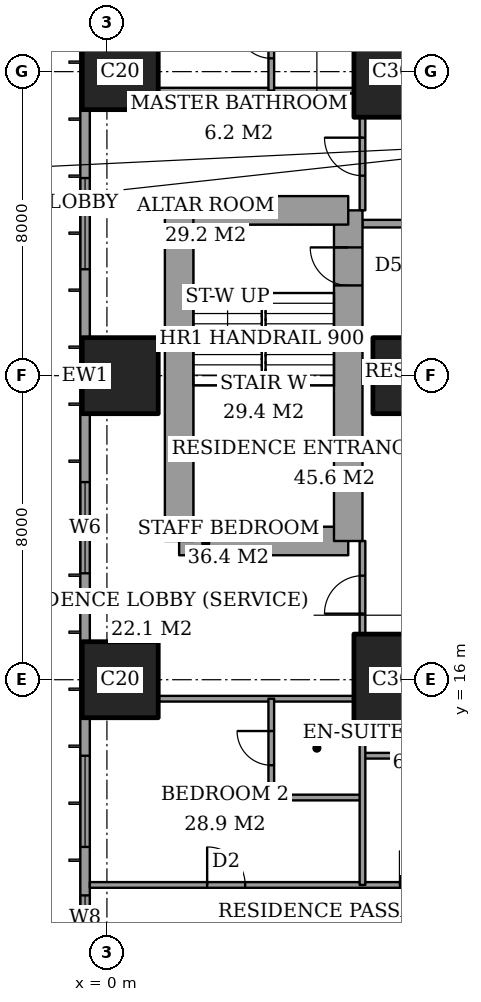
"""IFC4 building model, lengths in metres.
Left out: names, types, materials, properties, quantities, classifications, styles, units other than length and angle.
Written with IfcOpenShell. Run it as: python <this file> out.ifc"""

import sys

from ifc_helpers import new_model, si_unit, direction, frame, frame_2d, origin, origin_2d, place, context, subcontext, project, spatial, rectangle, extrude, element, fill, save


model = new_model("IFC4")
c1 = context("Model", 3, precision=1e-05, world=origin(), true_north=direction((0.0, 1.0)))
c2 = subcontext(c1, "Body", "Model", "MODEL_VIEW")
j1 = project(units=[si_unit("LENGTHUNIT", "METRE"), si_unit("PLANEANGLEUNIT", "RADIAN")], contexts=[c1])
p1 = place(None, origin())
s1 = spatial("IfcSite", under=j1, at=p1, CompositionType="ELEMENT")
p2 = place(p1, origin())
s2 = spatial("IfcBuilding", under=s1, at=p2, CompositionType="ELEMENT")
p3 = place(p2, frame((0.0, 0.0, 65.6)))
s3 = spatial("IfcBuildingStorey", under=s2, at=p3, CompositionType="ELEMENT", Elevation=65.6)
for number, where, z_axis, x_axis in (
    (1, (0.35, 16.0, 0.0), (0.0, 0.0, 1.0), (1.0, 0.0, 0.0)),
    (2, (0.35, 24.0, 0.0), (0.0, 0.0, 1.0), (1.0, 0.0, 0.0)),
    (3, (0.35, 32.0, 0.0), (0.0, 0.0, 1.0), (1.0, 0.0, 0.0)),
):
    element("IfcColumn", number, at=place(p3, frame(where, z_axis=z_axis, x_axis=x_axis)), inside=s3, PredefinedType="COLUMN", context=c2, shape_type="SweptSolid", body=[
        extrude(rectangle(XDim=2.0, YDim=2.0, at=origin_2d()), origin(), (0.0, 0.0, 1.0), 3.6),
    ])
p4 = place(p3, frame((8.0, 16.0, 0.0), z_axis=(0.0, 0.0, 1.0), x_axis=(1.0, 0.0, 0.0)))
e4 = element("IfcColumn", 4, at=p4, inside=s3, PredefinedType="COLUMN", context=c2, shape_type="SweptSolid", body=[
    extrude(rectangle(XDim=3.0, YDim=2.4, at=origin_2d()), origin(), (0.0, 0.0, 1.0), 3.6),
])
p5 = place(p3, frame((8.0, 24.0, 0.0), z_axis=(0.0, 0.0, 1.0), x_axis=(1.0, 0.0, 0.0)))
e5 = element("IfcColumn", 5, at=p5, inside=s3, PredefinedType="COLUMN", context=c2, shape_type="SweptSolid", body=[
    extrude(rectangle(XDim=2.0, YDim=2.0, at=origin_2d()), origin(), (0.0, 0.0, 1.0), 3.6),
])
p6 = place(p3, frame((8.0, 32.0, 0.0), z_axis=(0.0, 0.0, 1.0), x_axis=(1.0, 0.0, 0.0)))
e6 = element("IfcColumn", 6, at=p6, inside=s3, PredefinedType="COLUMN", context=c2, shape_type="SweptSolid", body=[
    extrude(rectangle(XDim=3.0, YDim=2.4, at=origin_2d()), origin(), (0.0, 0.0, 1.0), 3.6),
])
p7 = place(p3, frame((1.9, 19.65, 0.0), z_axis=(0.0, 0.0, 1.0), x_axis=(1.0, 0.0, 0.0)))
e7 = element("IfcWall", 7, at=p7, inside=s3, PredefinedType="SHEAR", context=c2, shape_type="SweptSolid", body=[
    extrude(rectangle(XDim=4.45, YDim=0.75, at=frame_2d((2.225, 0.0))), origin(), (0.0, 0.0, 1.0), 3.6),
])
p8 = place(p3, frame((6.35, 19.65, 0.0), z_axis=(0.0, 0.0, 1.0), x_axis=(0.0, 1.0, 0.0)))
e8 = element("IfcWall", 8, at=p8, inside=s3, PredefinedType="SHEAR", context=c2, shape_type="SweptSolid", body=[
    extrude(rectangle(XDim=8.7, YDim=0.75, at=frame_2d((4.35, 0.0))), origin(), (0.0, 0.0, 1.0), 3.6),
])
p9 = place(p8, frame((6.725, 0.0, 0.0)))
e9 = element("IfcOpeningElement", 9, at=p9, cuts=e8, PredefinedType="OPENING", context=c2, shape_type="SweptSolid", body=[
    extrude(rectangle(XDim=1.0, YDim=2.1, at=frame_2d((0.5, 1.05))), frame((0.0, 0.385, 0.0), z_axis=(0.0, -1.0, 0.0), x_axis=(1.0, 0.0, 0.0)), (0.0, 0.0, 1.0), 0.77),
])
p10 = place(p3, frame((6.35, 28.35, 0.0), z_axis=(0.0, 0.0, 1.0), x_axis=(-1.0, 0.0, 0.0)))
e10 = element("IfcWall", 10, at=p10, inside=s3, PredefinedType="SHEAR", context=c2, shape_type="SweptSolid", body=[
    extrude(rectangle(XDim=4.45, YDim=0.75, at=frame_2d((2.225, 0.0))), origin(), (0.0, 0.0, 1.0), 3.6),
])
p11 = place(p3, frame((1.9, 28.35, 0.0), z_axis=(0.0, 0.0, 1.0), x_axis=(0.0, -1.0, 0.0)))
e11 = element("IfcWall", 11, at=p11, inside=s3, PredefinedType="SHEAR", context=c2, shape_type="SweptSolid", body=[
    extrude(rectangle(XDim=8.7, YDim=0.75, at=frame_2d((4.35, 0.0))), origin(), (0.0, 0.0, 1.0), 3.6),
])
p12 = place(p3, frame((-0.575, 44.825, 0.0), z_axis=(0.0, 0.0, 1.0), x_axis=(0.0, -1.0, 0.0)))
e12 = element("IfcWall", 12, at=p12, inside=s3, PredefinedType="SOLIDWALL", context=c2, shape_type="SweptSolid", body=[
    extrude(rectangle(XDim=41.65, YDim=0.25, at=frame_2d((20.825, 0.0))), origin(), (0.0, 0.0, 1.0), 3.6),
])
p13 = place(p12, frame((0.775, 0.0, 0.6)))
e13 = element("IfcOpeningElement", 13, at=p13, cuts=e12, PredefinedType="OPENING", context=c2, shape_type="SweptSolid", body=[
    extrude(rectangle(XDim=2.4, YDim=2.0, at=frame_2d((1.2, 1.0))), frame((0.0, 0.135, 0.0), z_axis=(0.0, -1.0, 0.0), x_axis=(1.0, 0.0, 0.0)), (0.0, 0.0, 1.0), 0.27),
])
p14 = place(p12, frame((6.1, 0.0, 0.6)))
e14 = element("IfcOpeningElement", 14, at=p14, cuts=e12, PredefinedType="OPENING", context=c2, shape_type="SweptSolid", body=[
    extrude(rectangle(XDim=1.2, YDim=2.0, at=frame_2d((0.6, 1.0))), frame((0.0, 0.135, 0.0), z_axis=(0.0, -1.0, 0.0), x_axis=(1.0, 0.0, 0.0)), (0.0, 0.0, 1.0), 0.27),
])
p15 = place(p12, frame((8.425, 0.0, 0.6)))
e15 = element("IfcOpeningElement", 15, at=p15, cuts=e12, PredefinedType="OPENING", context=c2, shape_type="SweptSolid", body=[
    extrude(rectangle(XDim=2.4, YDim=2.0, at=frame_2d((1.2, 1.0))), frame((0.0, 0.135, 0.0), z_axis=(0.0, -1.0, 0.0), x_axis=(1.0, 0.0, 0.0)), (0.0, 0.0, 1.0), 0.27),
])
p16 = place(p12, frame((15.625, 0.0, 0.6)))
e16 = element("IfcOpeningElement", 16, at=p16, cuts=e12, PredefinedType="OPENING", context=c2, shape_type="SweptSolid", body=[
    extrude(rectangle(XDim=2.4, YDim=2.0, at=frame_2d((1.2, 1.0))), frame((0.0, 0.135, 0.0), z_axis=(0.0, -1.0, 0.0), x_axis=(1.0, 0.0, 0.0)), (0.0, 0.0, 1.0), 0.27),
])
p17 = place(p12, frame((23.625, 0.0, 0.6)))
e17 = element("IfcOpeningElement", 17, at=p17, cuts=e12, PredefinedType="OPENING", context=c2, shape_type="SweptSolid", body=[
    extrude(rectangle(XDim=2.4, YDim=2.0, at=frame_2d((1.2, 1.0))), frame((0.0, 0.135, 0.0), z_axis=(0.0, -1.0, 0.0), x_axis=(1.0, 0.0, 0.0)), (0.0, 0.0, 1.0), 0.27),
])
p18 = place(p12, frame((30.825, 0.0, 0.6)))
e18 = element("IfcOpeningElement", 18, at=p18, cuts=e12, PredefinedType="OPENING", context=c2, shape_type="SweptSolid", body=[
    extrude(rectangle(XDim=2.4, YDim=2.0, at=frame_2d((1.2, 1.0))), frame((0.0, 0.135, 0.0), z_axis=(0.0, -1.0, 0.0), x_axis=(1.0, 0.0, 0.0)), (0.0, 0.0, 1.0), 0.27),
])
p19 = place(p12, frame((34.5, 0.0, 0.6)))
e19 = element("IfcOpeningElement", 19, at=p19, cuts=e12, PredefinedType="OPENING", context=c2, shape_type="SweptSolid", body=[
    extrude(rectangle(XDim=1.2, YDim=2.0, at=frame_2d((0.6, 1.0))), frame((0.0, 0.135, 0.0), z_axis=(0.0, -1.0, 0.0), x_axis=(1.0, 0.0, 0.0)), (0.0, 0.0, 1.0), 0.27),
])
p20 = place(p12, frame((38.475, 0.0, 0.6)))
e20 = element("IfcOpeningElement", 20, at=p20, cuts=e12, PredefinedType="OPENING", context=c2, shape_type="SweptSolid", body=[
    extrude(rectangle(XDim=2.4, YDim=2.0, at=frame_2d((1.2, 1.0))), frame((0.0, 0.135, 0.0), z_axis=(0.0, -1.0, 0.0), x_axis=(1.0, 0.0, 0.0)), (0.0, 0.0, 1.0), 0.27),
])
p21 = place(p3, frame((-0.45, 10.6, 0.0), z_axis=(0.0, 0.0, 1.0), x_axis=(1.0, 0.0, 0.0)))
e21 = element("IfcWall", 21, at=p21, inside=s3, PredefinedType="PARTITIONING", context=c2, shape_type="SweptSolid", body=[
    extrude(rectangle(XDim=25.011, YDim=0.15, at=frame_2d((12.505, 0.0))), origin(), (0.0, 0.0, 1.0), 3.35),
])
p22 = place(p21, frame((10.65, 0.0, 0.0)))
e22 = element("IfcOpeningElement", 22, at=p22, cuts=e21, PredefinedType="OPENING", context=c2, shape_type="SweptSolid", body=[
    extrude(rectangle(XDim=1.0, YDim=2.1, at=frame_2d((0.5, 1.05))), frame((0.0, 0.085, 0.0), z_axis=(0.0, -1.0, 0.0), x_axis=(1.0, 0.0, 0.0)), (0.0, 0.0, 1.0), 0.17),
])
p23 = place(p21, frame((3.087, 0.0, 0.0)))
e23 = element("IfcOpeningElement", 23, at=p23, cuts=e21, PredefinedType="OPENING", context=c2, shape_type="SweptSolid", body=[
    extrude(rectangle(XDim=1.0, YDim=2.1, at=frame_2d((0.5, 1.05))), frame((0.0, 0.085, 0.0), z_axis=(0.0, -1.0, 0.0), x_axis=(1.0, 0.0, 0.0)), (0.0, 0.0, 1.0), 0.17),
])
p24 = place(p21, frame((8.163, 0.0, 0.0)))
e24 = element("IfcOpeningElement", 24, at=p24, cuts=e21, PredefinedType="OPENING", context=c2, shape_type="SweptSolid", body=[
    extrude(rectangle(XDim=0.9, YDim=2.1, at=frame_2d((0.45, 1.05))), frame((0.0, 0.085, 0.0), z_axis=(0.0, -1.0, 0.0), x_axis=(1.0, 0.0, 0.0)), (0.0, 0.0, 1.0), 0.17),
])
p25 = place(p21, frame((13.35, 0.0, 0.0)))
e25 = element("IfcOpeningElement", 25, at=p25, cuts=e21, PredefinedType="OPENING", context=c2, shape_type="SweptSolid", body=[
    extrude(rectangle(XDim=1.0, YDim=2.1, at=frame_2d((0.5, 1.05))), frame((0.0, 0.085, 0.0), z_axis=(0.0, -1.0, 0.0), x_axis=(1.0, 0.0, 0.0)), (0.0, 0.0, 1.0), 0.17),
])
p26 = place(p21, frame((16.45, 0.0, 0.0)))
e26 = element("IfcOpeningElement", 26, at=p26, cuts=e21, PredefinedType="OPENING", context=c2, shape_type="SweptSolid", body=[
    extrude(rectangle(XDim=1.0, YDim=2.1, at=frame_2d((0.5, 1.05))), frame((0.0, 0.085, 0.0), z_axis=(0.0, -1.0, 0.0), x_axis=(1.0, 0.0, 0.0)), (0.0, 0.0, 1.0), 0.17),
])
p27 = place(p21, frame((21.175, 0.0, 0.0)))
e27 = element("IfcOpeningElement", 27, at=p27, cuts=e21, PredefinedType="OPENING", context=c2, shape_type="SweptSolid", body=[
    extrude(rectangle(XDim=1.0, YDim=2.1, at=frame_2d((0.5, 1.05))), frame((0.0, 0.085, 0.0), z_axis=(0.0, -1.0, 0.0), x_axis=(1.0, 0.0, 0.0)), (0.0, 0.0, 1.0), 0.17),
])
p28 = place(p3, frame((4.325, 12.9, 0.0), z_axis=(0.0, 0.0, 1.0), x_axis=(1.0, 0.0, 0.0)))
e28 = element("IfcWall", 28, at=p28, inside=s3, PredefinedType="PARTITIONING", context=c2, shape_type="SweptSolid", body=[
    extrude(rectangle(XDim=2.4, YDim=0.15, at=frame_2d((1.2, 0.0))), origin(), (0.0, 0.0, 1.0), 3.35),
])
p29 = place(p3, frame((6.725, 14.0, 0.0), z_axis=(0.0, 0.0, 1.0), x_axis=(1.0, 0.0, 0.0)))
e29 = element("IfcWall", 29, at=p29, inside=s3, PredefinedType="PARTITIONING", context=c2, shape_type="SweptSolid", body=[
    extrude(rectangle(XDim=2.875, YDim=0.15, at=frame_2d((1.438, 0.0))), origin(), (0.0, 0.0, 1.0), 3.35),
])
p30 = place(p3, frame((1.35, 15.5, 0.0), z_axis=(0.0, 0.0, 1.0), x_axis=(1.0, 0.0, 0.0)))
e30 = element("IfcWall", 30, at=p30, inside=s3, PredefinedType="PARTITIONING", context=c2, shape_type="SweptSolid", body=[
    extrude(rectangle(XDim=5.15, YDim=0.15, at=frame_2d((2.575, 0.0))), origin(), (0.0, 0.0, 1.0), 3.35),
])
p31 = place(p3, frame((6.725, 28.0, 0.0), z_axis=(0.0, 0.0, 1.0), x_axis=(1.0, 0.0, 0.0)))
e31 = element("IfcWall", 31, at=p31, inside=s3, PredefinedType="PARTITIONING", context=c2, shape_type="SweptSolid", body=[
    extrude(rectangle(XDim=17.275, YDim=0.2, at=frame_2d((8.637, 0.0))), origin(), (0.0, 0.0, 1.0), 3.35),
])
p32 = place(p31, frame((6.475, 0.0, 0.0)))
e32 = element("IfcOpeningElement", 32, at=p32, cuts=e31, PredefinedType="OPENING", context=c2, shape_type="SweptSolid", body=[
    extrude(rectangle(XDim=1.2, YDim=2.4, at=frame_2d((0.6, 1.2))), frame((0.0, 0.11, 0.0), z_axis=(0.0, -1.0, 0.0), x_axis=(1.0, 0.0, 0.0)), (0.0, 0.0, 1.0), 0.22),
])
p33 = place(p3, frame((1.35, 31.5, 0.0), z_axis=(0.0, 0.0, 1.0), x_axis=(1.0, 0.0, 0.0)))
e33 = element("IfcWall", 33, at=p33, inside=s3, PredefinedType="PARTITIONING", context=c2, shape_type="SweptSolid", body=[
    extrude(rectangle(XDim=5.15, YDim=0.15, at=frame_2d((2.575, 0.0))), origin(), (0.0, 0.0, 1.0), 3.35),
])
p34 = place(p3, frame((4.325, 12.9, 0.0), z_axis=(0.0, 0.0, 1.0), x_axis=(0.0, 1.0, 0.0)))
e34 = element("IfcWall", 34, at=p34, inside=s3, PredefinedType="PARTITIONING", context=c2, shape_type="SweptSolid", body=[
    extrude(rectangle(XDim=2.6, YDim=0.15, at=frame_2d((1.3, 0.0))), origin(), (0.0, 0.0, 1.0), 3.35),
])
p35 = place(p34, frame((0.85, 0.0, 0.0)))
e35 = element("IfcOpeningElement", 35, at=p35, cuts=e34, PredefinedType="OPENING", context=c2, shape_type="SweptSolid", body=[
    extrude(rectangle(XDim=0.9, YDim=2.1, at=frame_2d((0.45, 1.05))), frame((0.0, 0.085, 0.0), z_axis=(0.0, -1.0, 0.0), x_axis=(1.0, 0.0, 0.0)), (0.0, 0.0, 1.0), 0.17),
])
p36 = place(p3, frame((4.325, 31.5, 0.0), z_axis=(0.0, 0.0, 1.0), x_axis=(0.0, 1.0, 0.0)))
e36 = element("IfcWall", 36, at=p36, inside=s3, PredefinedType="PARTITIONING", context=c2, shape_type="SweptSolid", body=[
    extrude(rectangle(XDim=2.6, YDim=0.15, at=frame_2d((1.3, 0.0))), origin(), (0.0, 0.0, 1.0), 3.35),
])
p37 = place(p36, frame((0.85, 0.0, 0.0)))
e37 = element("IfcOpeningElement", 37, at=p37, cuts=e36, PredefinedType="OPENING", context=c2, shape_type="SweptSolid", body=[
    extrude(rectangle(XDim=0.9, YDim=2.1, at=frame_2d((0.45, 1.05))), frame((0.0, 0.085, 0.0), z_axis=(0.0, -1.0, 0.0), x_axis=(1.0, 0.0, 0.0)), (0.0, 0.0, 1.0), 0.17),
])
p38 = place(p3, frame((6.725, 10.6, 0.0), z_axis=(0.0, 0.0, 1.0), x_axis=(0.0, 1.0, 0.0)))
e38 = element("IfcWall", 38, at=p38, inside=s3, PredefinedType="PARTITIONING", context=c2, shape_type="SweptSolid", body=[
    extrude(rectangle(XDim=4.2, YDim=0.15, at=frame_2d((2.1, 0.0))), origin(), (0.0, 0.0, 1.0), 3.35),
])
p39 = place(p3, frame((6.725, 17.2, 0.0), z_axis=(0.0, 0.0, 1.0), x_axis=(0.0, 1.0, 0.0)))
e39 = element("IfcWall", 39, at=p39, inside=s3, PredefinedType="PARTITIONING", context=c2, shape_type="SweptSolid", body=[
    extrude(rectangle(XDim=2.45, YDim=0.15, at=frame_2d((1.225, 0.0))), origin(), (0.0, 0.0, 1.0), 3.35),
])
p40 = place(p39, frame((0.538, 0.0, 0.0)))
e40 = element("IfcOpeningElement", 40, at=p40, cuts=e39, PredefinedType="OPENING", context=c2, shape_type="SweptSolid", body=[
    extrude(rectangle(XDim=1.0, YDim=2.1, at=frame_2d((0.5, 1.05))), frame((0.0, 0.085, 0.0), z_axis=(0.0, -1.0, 0.0), x_axis=(1.0, 0.0, 0.0)), (0.0, 0.0, 1.0), 0.17),
])
p41 = place(p3, frame((6.725, 28.35, 0.0), z_axis=(0.0, 0.0, 1.0), x_axis=(0.0, 1.0, 0.0)))
e41 = element("IfcWall", 41, at=p41, inside=s3, PredefinedType="PARTITIONING", context=c2, shape_type="SweptSolid", body=[
    extrude(rectangle(XDim=2.45, YDim=0.15, at=frame_2d((1.225, 0.0))), origin(), (0.0, 0.0, 1.0), 3.35),
])
p42 = place(p41, frame((0.913, 0.0, 0.0)))
e42 = element("IfcOpeningElement", 42, at=p42, cuts=e41, PredefinedType="OPENING", context=c2, shape_type="SweptSolid", body=[
    extrude(rectangle(XDim=1.0, YDim=2.1, at=frame_2d((0.5, 1.05))), frame((0.0, 0.085, 0.0), z_axis=(0.0, -1.0, 0.0), x_axis=(1.0, 0.0, 0.0)), (0.0, 0.0, 1.0), 0.17),
])
p43 = place(p16, origin())
e43 = element("IfcWindow", 43, at=p43, inside=s3, PartitioningType="SINGLE_PANEL", PredefinedType="WINDOW", context=c2, shape_type="SweptSolid", body=[
    extrude(rectangle(XDim=2.4, YDim=2.0, at=frame_2d((1.2, 1.0))), frame((0.0, 0.03, 0.0), z_axis=(0.0, -1.0, 0.0), x_axis=(1.0, 0.0, 0.0)), (0.0, 0.0, 1.0), 0.06),
])
fill(e16, e43)
p44 = place(p17, origin())
e44 = element("IfcWindow", 44, at=p44, inside=s3, PartitioningType="SINGLE_PANEL", PredefinedType="WINDOW", context=c2, shape_type="SweptSolid", body=[
    extrude(rectangle(XDim=2.4, YDim=2.0, at=frame_2d((1.2, 1.0))), frame((0.0, 0.03, 0.0), z_axis=(0.0, -1.0, 0.0), x_axis=(1.0, 0.0, 0.0)), (0.0, 0.0, 1.0), 0.06),
])
fill(e17, e44)
p45 = place(p18, origin())
e45 = element("IfcWindow", 45, at=p45, inside=s3, PartitioningType="SINGLE_PANEL", PredefinedType="WINDOW", context=c2, shape_type="SweptSolid", body=[
    extrude(rectangle(XDim=2.4, YDim=2.0, at=frame_2d((1.2, 1.0))), frame((0.0, 0.03, 0.0), z_axis=(0.0, -1.0, 0.0), x_axis=(1.0, 0.0, 0.0)), (0.0, 0.0, 1.0), 0.06),
])
fill(e18, e45)
p46 = place(p19, origin())
e46 = element("IfcWindow", 46, at=p46, inside=s3, PartitioningType="SINGLE_PANEL", PredefinedType="WINDOW", context=c2, shape_type="SweptSolid", body=[
    extrude(rectangle(XDim=1.2, YDim=2.0, at=frame_2d((0.6, 1.0))), frame((0.0, 0.03, 0.0), z_axis=(0.0, -1.0, 0.0), x_axis=(1.0, 0.0, 0.0)), (0.0, 0.0, 1.0), 0.06),
])
fill(e19, e46)
p47 = place(p35, origin())
e47 = element("IfcDoor", 47, at=p47, inside=s3, OperationType="SINGLE_SWING_LEFT", PredefinedType="DOOR", context=c2, shape_type="SweptSolid", body=[
    extrude(rectangle(XDim=0.9, YDim=2.1, at=frame_2d((0.45, 1.05))), frame((0.0, 0.025, 0.0), z_axis=(0.0, -1.0, 0.0), x_axis=(1.0, 0.0, 0.0)), (0.0, 0.0, 1.0), 0.05),
])
fill(e35, e47)
p48 = place(p23, origin())
e48 = element("IfcDoor", 48, at=p48, inside=s3, OperationType="SINGLE_SWING_RIGHT", PredefinedType="DOOR", context=c2, shape_type="SweptSolid", body=[
    extrude(rectangle(XDim=1.0, YDim=2.1, at=frame_2d((0.5, 1.05))), frame((0.0, 0.025, 0.0), z_axis=(0.0, -1.0, 0.0), x_axis=(1.0, 0.0, 0.0)), (0.0, 0.0, 1.0), 0.05),
])
fill(e23, e48)
p49 = place(p40, origin())
e49 = element("IfcDoor", 49, at=p49, inside=s3, OperationType="SINGLE_SWING_RIGHT", PredefinedType="DOOR", context=c2, shape_type="SweptSolid", body=[
    extrude(rectangle(XDim=1.0, YDim=2.1, at=frame_2d((0.5, 1.05))), frame((0.0, 0.025, 0.0), z_axis=(0.0, -1.0, 0.0), x_axis=(1.0, 0.0, 0.0)), (0.0, 0.0, 1.0), 0.05),
])
fill(e40, e49)
p50 = place(p24, origin())
e50 = element("IfcDoor", 50, at=p50, inside=s3, OperationType="SINGLE_SWING_RIGHT", PredefinedType="DOOR", context=c2, shape_type="SweptSolid", body=[
    extrude(rectangle(XDim=0.9, YDim=2.1, at=frame_2d((0.45, 1.05))), frame((0.0, 0.025, 0.0), z_axis=(0.0, -1.0, 0.0), x_axis=(1.0, 0.0, 0.0)), (0.0, 0.0, 1.0), 0.05),
])
fill(e24, e50)
p51 = place(p37, origin())
e51 = element("IfcDoor", 51, at=p51, inside=s3, OperationType="SINGLE_SWING_LEFT", PredefinedType="DOOR", context=c2, shape_type="SweptSolid", body=[
    extrude(rectangle(XDim=0.9, YDim=2.1, at=frame_2d((0.45, 1.05))), frame((0.0, 0.025, 0.0), z_axis=(0.0, -1.0, 0.0), x_axis=(1.0, 0.0, 0.0)), (0.0, 0.0, 1.0), 0.05),
])
fill(e37, e51)
p52 = place(p42, origin())
e52 = element("IfcDoor", 52, at=p52, inside=s3, OperationType="SINGLE_SWING_LEFT", PredefinedType="DOOR", context=c2, shape_type="SweptSolid", body=[
    extrude(rectangle(XDim=1.0, YDim=2.1, at=frame_2d((0.5, 1.05))), frame((0.0, 0.025, 0.0), z_axis=(0.0, -1.0, 0.0), x_axis=(1.0, 0.0, 0.0)), (0.0, 0.0, 1.0), 0.05),
])
fill(e42, e52)
p53 = place(p9, origin())
e53 = element("IfcDoor", 53, at=p53, inside=s3, OperationType="SINGLE_SWING_LEFT", PredefinedType="DOOR", context=c2, shape_type="SweptSolid", body=[
    extrude(rectangle(XDim=1.0, YDim=2.1, at=frame_2d((0.5, 1.05))), frame((0.0, 0.025, 0.0), z_axis=(0.0, -1.0, 0.0), x_axis=(1.0, 0.0, 0.0)), (0.0, 0.0, 1.0), 0.05),
])
fill(e9, e53)
save(model, sys.argv[1])
